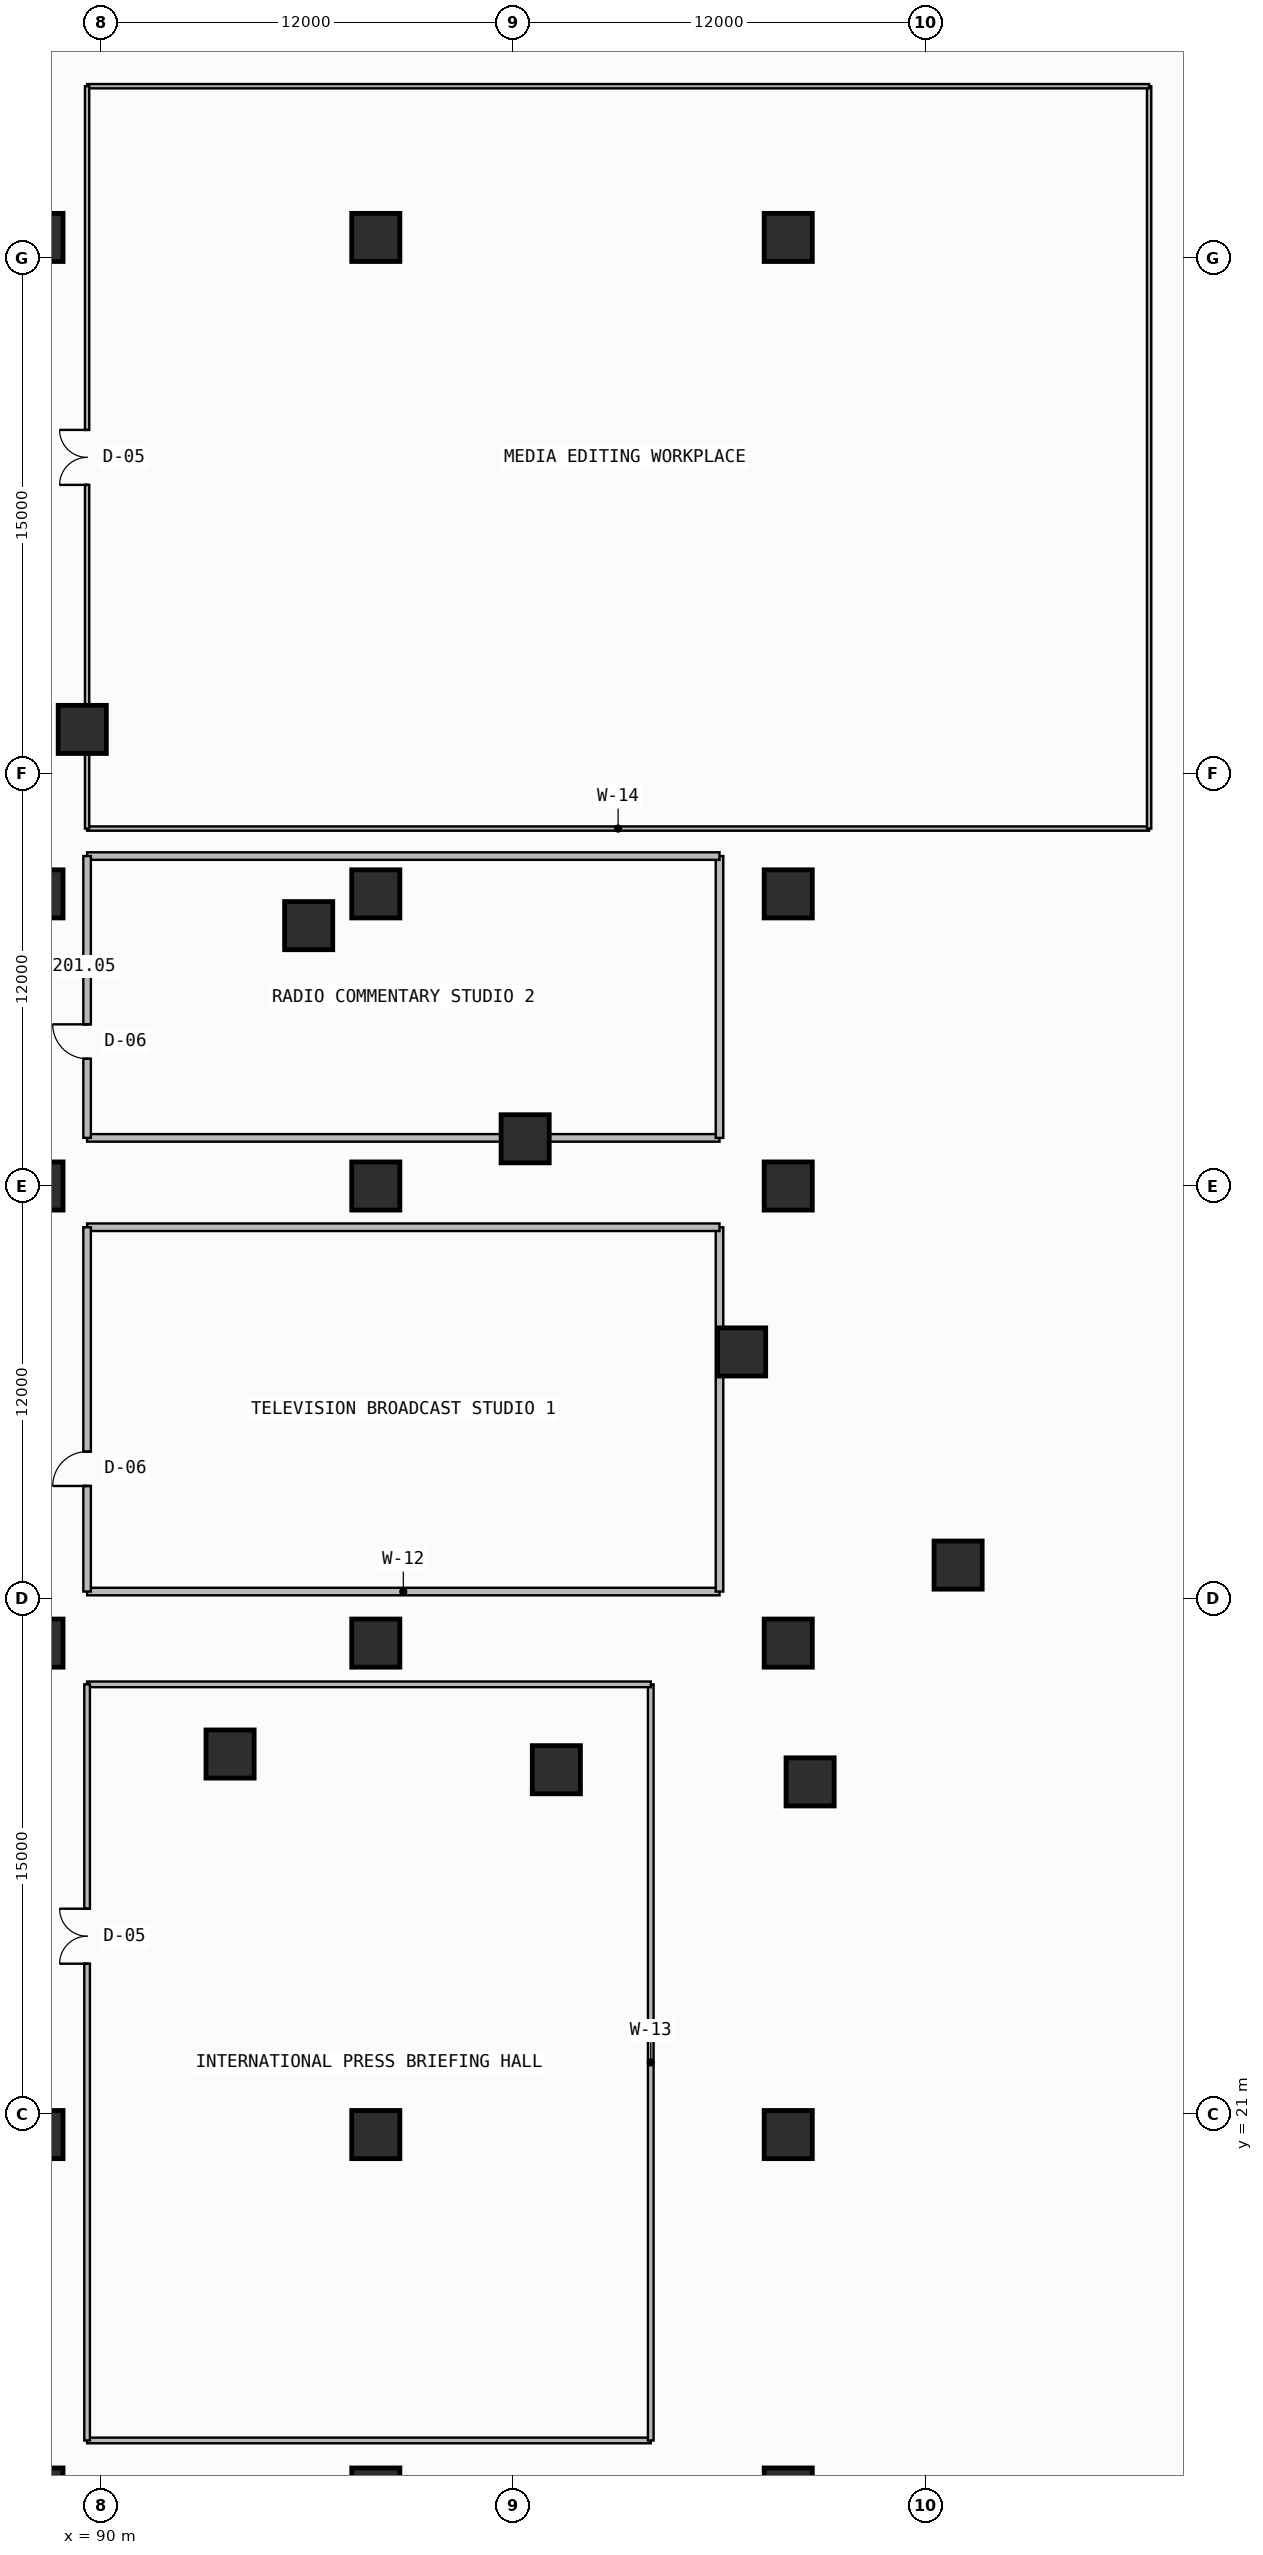
"""IFC4 building model, lengths in metres.
Left out: names, types, materials, properties, quantities, classifications, styles, units other than length and angle.
Written with IfcOpenShell. Run it as: python <this file> out.ifc"""

import sys

from ifc_helpers import new_model, si_unit, direction, frame, frame_2d, origin, origin_2d, place, context, subcontext, project, spatial, rectangle, extrude, element, fill, save


model = new_model("IFC4")
c1 = context("Model", 3, precision=1e-05, world=origin(), true_north=direction((0.0, 1.0)))
c2 = subcontext(c1, "Body", "Model", "MODEL_VIEW")
j1 = project(units=[si_unit("LENGTHUNIT", "METRE"), si_unit("PLANEANGLEUNIT", "RADIAN")], contexts=[c1])
p1 = place(None, origin())
s1 = spatial("IfcSite", under=j1, at=p1, CompositionType="ELEMENT")
p2 = place(p1, origin())
s2 = spatial("IfcBuilding", under=s1, at=p2, CompositionType="ELEMENT")
p3 = place(p2, frame((0.0, 0.0, 13.2)))
s3 = spatial("IfcBuildingStorey", under=s2, at=p3, CompositionType="ELEMENT", Elevation=13.2)
for number, where, z_axis, x_axis in (
    (1, (88.2, 10.0, 0.0), (0.0, 0.0, 1.0), (1.0, 0.0, 0.0)),
    (2, (88.2, 20.4, 0.0), (0.0, 0.0, 1.0), (1.0, 0.0, 0.0)),
    (3, (88.2, 34.7, 0.0), (0.0, 0.0, 1.0), (1.0, 0.0, 0.0)),
    (4, (88.2, 48.0, 0.0), (0.0, 0.0, 1.0), (1.0, 0.0, 0.0)),
    (5, (88.2, 56.5, 0.0), (0.0, 0.0, 1.0), (1.0, 0.0, 0.0)),
    (6, (88.2, 75.6, 0.0), (0.0, 0.0, 1.0), (1.0, 0.0, 0.0)),
    (7, (98.0, 10.0, 0.0), (0.0, 0.0, 1.0), (1.0, 0.0, 0.0)),
    (8, (98.0, 20.4, 0.0), (0.0, 0.0, 1.0), (1.0, 0.0, 0.0)),
    (9, (98.0, 34.7, 0.0), (0.0, 0.0, 1.0), (1.0, 0.0, 0.0)),
    (10, (98.0, 48.0, 0.0), (0.0, 0.0, 1.0), (1.0, 0.0, 0.0)),
    (11, (98.0, 56.5, 0.0), (0.0, 0.0, 1.0), (1.0, 0.0, 0.0)),
    (12, (98.0, 75.6, 0.0), (0.0, 0.0, 1.0), (1.0, 0.0, 0.0)),
    (13, (110.0, 10.0, 0.0), (0.0, 0.0, 1.0), (1.0, 0.0, 0.0)),
    (14, (110.0, 20.4, 0.0), (0.0, 0.0, 1.0), (1.0, 0.0, 0.0)),
    (15, (110.0, 34.7, 0.0), (0.0, 0.0, 1.0), (1.0, 0.0, 0.0)),
    (16, (110.0, 48.0, 0.0), (0.0, 0.0, 1.0), (1.0, 0.0, 0.0)),
    (17, (110.0, 56.5, 0.0), (0.0, 0.0, 1.0), (1.0, 0.0, 0.0)),
    (18, (110.0, 75.6, 0.0), (0.0, 0.0, 1.0), (1.0, 0.0, 0.0)),
    (19, (93.76, 31.472, 0.0), (0.0, 0.0, 1.0), (1.0, 0.0, 0.0)),
    (20, (103.253, 31.017, 0.0), (0.0, 0.0, 1.0), (1.0, 0.0, 0.0)),
    (21, (110.636, 30.662, 0.0), (0.0, 0.0, 1.0), (1.0, 0.0, 0.0)),
    (22, (114.942, 36.97, 0.0), (0.0, 0.0, 1.0), (1.0, 0.0, 0.0)),
    (23, (108.644, 43.172, 0.0), (0.0, 0.0, 1.0), (1.0, 0.0, 0.0)),
    (24, (102.345, 49.374, 0.0), (0.0, 0.0, 1.0), (1.0, 0.0, 0.0)),
    (25, (96.047, 55.576, 0.0), (0.0, 0.0, 1.0), (1.0, 0.0, 0.0)),
    (26, (89.46, 61.285, 0.0), (0.0, 0.0, 1.0), (1.0, 0.0, 0.0)),
):
    element("IfcColumn", number, at=place(p3, frame(where, z_axis=z_axis, x_axis=x_axis)), inside=s3, PredefinedType="COLUMN", context=c2, shape_type="SweptSolid", body=[
        extrude(rectangle(XDim=1.4, YDim=1.4, at=origin_2d()), origin(), (0.0, 0.0, 1.0), 4.2),
    ])
p4 = place(p3, frame((89.6, 11.5, 0.0), z_axis=(0.0, 0.0, 1.0), x_axis=(1.0, 0.0, 0.0)))
e27 = element("IfcWall", 27, at=p4, inside=s3, PredefinedType="PARTITIONING", context=c2, shape_type="SweptSolid", body=[
    extrude(rectangle(XDim=16.4, YDim=0.165, at=frame_2d((8.2, 0.0))), origin(), (0.0, 0.0, 1.0), 3.165),
])
p5 = place(p3, frame((106.0, 11.5, 0.0), z_axis=(0.0, 0.0, 1.0), x_axis=(0.0, 1.0, 0.0)))
e28 = element("IfcWall", 28, at=p5, inside=s3, PredefinedType="PARTITIONING", context=c2, shape_type="SweptSolid", body=[
    extrude(rectangle(XDim=22.0, YDim=0.165, at=frame_2d((11.0, 0.0))), origin(), (0.0, 0.0, 1.0), 3.165),
])
p6 = place(p3, frame((106.0, 33.5, 0.0), z_axis=(0.0, 0.0, 1.0), x_axis=(-1.0, 0.0, 0.0)))
e29 = element("IfcWall", 29, at=p6, inside=s3, PredefinedType="PARTITIONING", context=c2, shape_type="SweptSolid", body=[
    extrude(rectangle(XDim=16.4, YDim=0.165, at=frame_2d((8.2, 0.0))), origin(), (0.0, 0.0, 1.0), 3.165),
])
p7 = place(p3, frame((89.6, 33.5, 0.0), z_axis=(0.0, 0.0, 1.0), x_axis=(0.0, -1.0, 0.0)))
e30 = element("IfcWall", 30, at=p7, inside=s3, PredefinedType="PARTITIONING", context=c2, shape_type="SweptSolid", body=[
    extrude(rectangle(XDim=22.0, YDim=0.165, at=frame_2d((11.0, 0.0))), origin(), (0.0, 0.0, 1.0), 3.165),
])
p8 = place(p7, frame((6.528, 0.0, 0.0)))
e31 = element("IfcOpeningElement", 31, at=p8, cuts=e30, PredefinedType="OPENING", context=c2, shape_type="SweptSolid", body=[
    extrude(rectangle(XDim=1.6, YDim=2.3, at=frame_2d((0.8, 1.15))), frame((0.0, 0.093, 0.0), z_axis=(0.0, -1.0, 0.0), x_axis=(1.0, 0.0, 0.0)), (0.0, 0.0, 1.0), 0.185),
])
p9 = place(p3, frame((89.6, 36.2, 0.0), z_axis=(0.0, 0.0, 1.0), x_axis=(1.0, 0.0, 0.0)))
e32 = element("IfcWall", 32, at=p9, inside=s3, PredefinedType="SOLIDWALL", context=c2, shape_type="SweptSolid", body=[
    extrude(rectangle(XDim=18.4, YDim=0.22, at=frame_2d((9.2, 0.0))), origin(), (0.0, 0.0, 1.0), 3.165),
])
p10 = place(p3, frame((108.0, 36.2, 0.0), z_axis=(0.0, 0.0, 1.0), x_axis=(0.0, 1.0, 0.0)))
e33 = element("IfcWall", 33, at=p10, inside=s3, PredefinedType="SOLIDWALL", context=c2, shape_type="SweptSolid", body=[
    extrude(rectangle(XDim=10.6, YDim=0.22, at=frame_2d((5.3, 0.0))), origin(), (0.0, 0.0, 1.0), 3.88),
])
p11 = place(p3, frame((108.0, 46.8, 0.0), z_axis=(0.0, 0.0, 1.0), x_axis=(-1.0, 0.0, 0.0)))
e34 = element("IfcWall", 34, at=p11, inside=s3, PredefinedType="SOLIDWALL", context=c2, shape_type="SweptSolid", body=[
    extrude(rectangle(XDim=18.4, YDim=0.22, at=frame_2d((9.2, 0.0))), origin(), (0.0, 0.0, 1.0), 3.165),
])
p12 = place(p3, frame((89.6, 46.8, 0.0), z_axis=(0.0, 0.0, 1.0), x_axis=(0.0, -1.0, 0.0)))
e35 = element("IfcWall", 35, at=p12, inside=s3, PredefinedType="SOLIDWALL", context=c2, shape_type="SweptSolid", body=[
    extrude(rectangle(XDim=10.6, YDim=0.22, at=frame_2d((5.3, 0.0))), origin(), (0.0, 0.0, 1.0), 3.88),
])
p13 = place(p12, frame((6.528, 0.0, 0.0)))
e36 = element("IfcOpeningElement", 36, at=p13, cuts=e35, PredefinedType="OPENING", context=c2, shape_type="SweptSolid", body=[
    extrude(rectangle(XDim=1.0, YDim=2.2, at=frame_2d((0.5, 1.1))), frame((0.0, 0.12, 0.0), z_axis=(0.0, -1.0, 0.0), x_axis=(1.0, 0.0, 0.0)), (0.0, 0.0, 1.0), 0.24),
])
p14 = place(p3, frame((89.6, 49.4, 0.0), z_axis=(0.0, 0.0, 1.0), x_axis=(1.0, 0.0, 0.0)))
e37 = element("IfcWall", 37, at=p14, inside=s3, PredefinedType="SOLIDWALL", context=c2, shape_type="SweptSolid", body=[
    extrude(rectangle(XDim=18.4, YDim=0.22, at=frame_2d((9.2, 0.0))), origin(), (0.0, 0.0, 1.0), 3.165),
])
p15 = place(p3, frame((108.0, 49.4, 0.0), z_axis=(0.0, 0.0, 1.0), x_axis=(0.0, 1.0, 0.0)))
e38 = element("IfcWall", 38, at=p15, inside=s3, PredefinedType="SOLIDWALL", context=c2, shape_type="SweptSolid", body=[
    extrude(rectangle(XDim=8.2, YDim=0.22, at=frame_2d((4.1, 0.0))), origin(), (0.0, 0.0, 1.0), 3.165),
])
p16 = place(p3, frame((108.0, 57.6, 0.0), z_axis=(0.0, 0.0, 1.0), x_axis=(-1.0, 0.0, 0.0)))
e39 = element("IfcWall", 39, at=p16, inside=s3, PredefinedType="SOLIDWALL", context=c2, shape_type="SweptSolid", body=[
    extrude(rectangle(XDim=18.4, YDim=0.22, at=frame_2d((9.2, 0.0))), origin(), (0.0, 0.0, 1.0), 3.165),
])
p17 = place(p3, frame((89.6, 57.6, 0.0), z_axis=(0.0, 0.0, 1.0), x_axis=(0.0, -1.0, 0.0)))
e40 = element("IfcWall", 40, at=p17, inside=s3, PredefinedType="SOLIDWALL", context=c2, shape_type="SweptSolid", body=[
    extrude(rectangle(XDim=8.2, YDim=0.22, at=frame_2d((4.1, 0.0))), origin(), (0.0, 0.0, 1.0), 3.165),
])
p18 = place(p17, frame((4.896, 0.0, 0.0)))
e41 = element("IfcOpeningElement", 41, at=p18, cuts=e40, PredefinedType="OPENING", context=c2, shape_type="SweptSolid", body=[
    extrude(rectangle(XDim=1.0, YDim=2.2, at=frame_2d((0.5, 1.1))), frame((0.0, 0.12, 0.0), z_axis=(0.0, -1.0, 0.0), x_axis=(1.0, 0.0, 0.0)), (0.0, 0.0, 1.0), 0.24),
])
p19 = place(p3, frame((89.6, 58.4, 0.0), z_axis=(0.0, 0.0, 1.0), x_axis=(1.0, 0.0, 0.0)))
e42 = element("IfcWall", 42, at=p19, inside=s3, PredefinedType="PARTITIONING", context=c2, shape_type="SweptSolid", body=[
    extrude(rectangle(XDim=30.9, YDim=0.125, at=frame_2d((15.45, 0.0))), origin(), (0.0, 0.0, 1.0), 3.165),
])
p20 = place(p3, frame((120.5, 58.4, 0.0), z_axis=(0.0, 0.0, 1.0), x_axis=(0.0, 1.0, 0.0)))
e43 = element("IfcWall", 43, at=p20, inside=s3, PredefinedType="PARTITIONING", context=c2, shape_type="SweptSolid", body=[
    extrude(rectangle(XDim=21.6, YDim=0.125, at=frame_2d((10.8, 0.0))), origin(), (0.0, 0.0, 1.0), 3.165),
])
p21 = place(p3, frame((120.5, 80.0, 0.0), z_axis=(0.0, 0.0, 1.0), x_axis=(-1.0, 0.0, 0.0)))
e44 = element("IfcWall", 44, at=p21, inside=s3, PredefinedType="PARTITIONING", context=c2, shape_type="SweptSolid", body=[
    extrude(rectangle(XDim=30.9, YDim=0.125, at=frame_2d((15.45, 0.0))), origin(), (0.0, 0.0, 1.0), 3.165),
])
p22 = place(p3, frame((89.6, 80.0, 0.0), z_axis=(0.0, 0.0, 1.0), x_axis=(0.0, -1.0, 0.0)))
e45 = element("IfcWall", 45, at=p22, inside=s3, PredefinedType="PARTITIONING", context=c2, shape_type="SweptSolid", body=[
    extrude(rectangle(XDim=21.6, YDim=0.125, at=frame_2d((10.8, 0.0))), origin(), (0.0, 0.0, 1.0), 3.165),
])
p23 = place(p22, frame((10.0, 0.0, 0.0)))
e46 = element("IfcOpeningElement", 46, at=p23, cuts=e45, PredefinedType="OPENING", context=c2, shape_type="SweptSolid", body=[
    extrude(rectangle(XDim=1.6, YDim=2.3, at=frame_2d((0.8, 1.15))), frame((0.0, 0.073, 0.0), z_axis=(0.0, -1.0, 0.0), x_axis=(1.0, 0.0, 0.0)), (0.0, 0.0, 1.0), 0.145),
])
p24 = place(p8, frame((1.6, 0.0, 0.0), z_axis=(0.0, 0.0, 1.0), x_axis=(-1.0, 0.0, 0.0)))
e47 = element("IfcDoor", 47, at=p24, inside=s3, OperationType="DOUBLE_DOOR_SINGLE_SWING", PredefinedType="DOOR", context=c2, shape_type="SweptSolid", body=[
    extrude(rectangle(XDim=1.6, YDim=2.3, at=frame_2d((0.8, 1.15))), frame((0.0, 0.025, 0.0), z_axis=(0.0, -1.0, 0.0), x_axis=(1.0, 0.0, 0.0)), (0.0, 0.0, 1.0), 0.05),
])
fill(e31, e47)
p25 = place(p13, frame((1.0, 0.0, 0.0), z_axis=(0.0, 0.0, 1.0), x_axis=(-1.0, 0.0, 0.0)))
e48 = element("IfcDoor", 48, at=p25, inside=s3, OperationType="SINGLE_SWING_LEFT", PredefinedType="DOOR", context=c2, shape_type="SweptSolid", body=[
    extrude(rectangle(XDim=1.0, YDim=2.2, at=frame_2d((0.5, 1.1))), frame((0.0, 0.025, 0.0), z_axis=(0.0, -1.0, 0.0), x_axis=(1.0, 0.0, 0.0)), (0.0, 0.0, 1.0), 0.05),
])
fill(e36, e48)
p26 = place(p18, frame((1.0, 0.0, 0.0), z_axis=(0.0, 0.0, 1.0), x_axis=(-1.0, 0.0, 0.0)))
e49 = element("IfcDoor", 49, at=p26, inside=s3, OperationType="SINGLE_SWING_RIGHT", PredefinedType="DOOR", context=c2, shape_type="SweptSolid", body=[
    extrude(rectangle(XDim=1.0, YDim=2.2, at=frame_2d((0.5, 1.1))), frame((0.0, 0.025, 0.0), z_axis=(0.0, -1.0, 0.0), x_axis=(1.0, 0.0, 0.0)), (0.0, 0.0, 1.0), 0.05),
])
fill(e41, e49)
p27 = place(p23, frame((1.6, 0.0, 0.0), z_axis=(0.0, 0.0, 1.0), x_axis=(-1.0, 0.0, 0.0)))
e50 = element("IfcDoor", 50, at=p27, inside=s3, OperationType="DOUBLE_DOOR_SINGLE_SWING", PredefinedType="DOOR", context=c2, shape_type="SweptSolid", body=[
    extrude(rectangle(XDim=1.6, YDim=2.3, at=frame_2d((0.8, 1.15))), frame((0.0, 0.025, 0.0), z_axis=(0.0, -1.0, 0.0), x_axis=(1.0, 0.0, 0.0)), (0.0, 0.0, 1.0), 0.05),
])
fill(e46, e50)
save(model, sys.argv[1])
